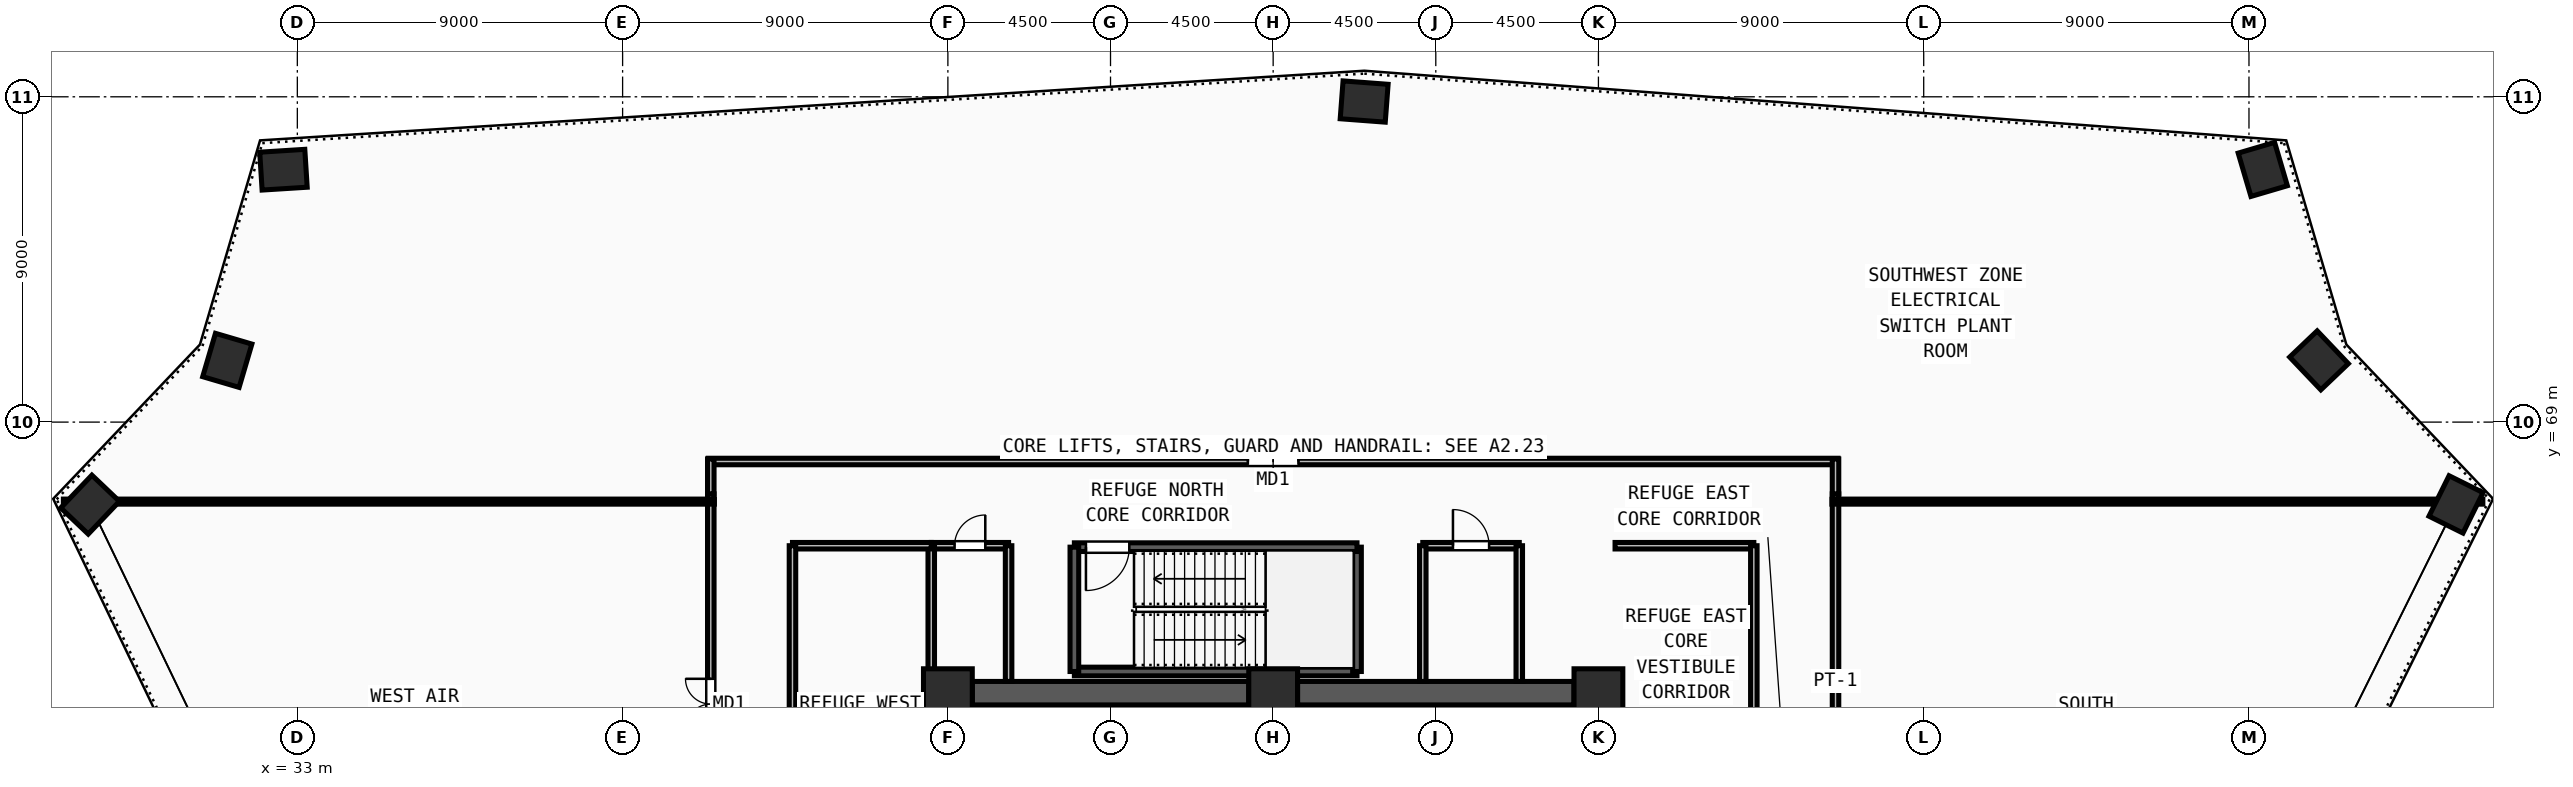
"""IFC4 building model, lengths in metres.
Left out: names, types, materials, properties, quantities, classifications, styles, units other than length and angle.
Written with IfcOpenShell. Run it as: python <this file> out.ifc"""

import sys

from ifc_helpers import new_model, si_unit, direction, frame, frame_2d, origin, origin_2d, place, context, subcontext, project, spatial, rectangle, extrude, source, transform, mapped, element, fill, save


model = new_model("IFC4")
c1 = context("Model", 3, precision=1e-05, world=origin(), true_north=direction((0.0, 1.0)))
c2 = subcontext(c1, "Body", "Model", "MODEL_VIEW")
j1 = project(units=[si_unit("LENGTHUNIT", "METRE"), si_unit("PLANEANGLEUNIT", "RADIAN")], contexts=[c1])
p1 = place(None, origin())
s1 = spatial("IfcSite", under=j1, at=p1, CompositionType="ELEMENT")
p2 = place(p1, origin())
s2 = spatial("IfcBuilding", under=s1, at=p2, CompositionType="ELEMENT")
p3 = place(p2, frame((0.0, 0.0, 231.75)))
s3 = spatial("IfcBuildingStorey", under=s2, at=p3, CompositionType="ELEMENT", Elevation=231.75)
m1 = source(origin(), c2, "Body", "SweptSolid", [
    extrude(rectangle(XDim=1.35, YDim=1.35, at=origin_2d()), origin(), (0.0, 0.0, 1.0), 4.5),
])
for number, where, z_axis, x_axis in (
    (1, (69.0, 61.5, 0.0), (0.0, 0.0, 1.0), (1.0, 0.0, 0.0)),
    (2, (60.0, 61.5, 0.0), (0.0, 0.0, 1.0), (1.0, 0.0, 0.0)),
    (3, (51.0, 61.5, 0.0), (0.0, 0.0, 1.0), (1.0, 0.0, 0.0)),
):
    element("IfcColumn", number, at=place(p3, frame(where, z_axis=z_axis, x_axis=x_axis)), inside=s3, PredefinedType="COLUMN", context=c2, shape_type="MappedRepresentation", body=[
        mapped(m1, transform((0.0, 0.0, 0.0), x_axis=(1.0, 0.0, 0.0), y_axis=(0.0, 1.0, 0.0), z_axis=(0.0, 0.0, 1.0), scale=1.0)),
    ])
m2 = source(origin(), c2, "Body", "SweptSolid", [
    extrude(rectangle(XDim=1.25, YDim=1.05, at=origin_2d()), origin(), (0.0, 0.0, 1.0), 4.5),
])
for number, where, z_axis, x_axis in (
    (4, (27.265, 66.717, 0.0), (0.0, 0.0, 1.0), (0.689, 0.724, 0.0)),
    (5, (31.062, 70.708, 0.0), (0.0, 0.0, 1.0), (0.283, 0.959, 0.0)),
    (6, (32.616, 75.983, 0.0), (0.0, 0.0, 1.0), (0.998, 0.063, 0.0)),
    (7, (62.518, 77.869, 0.0), (0.0, 0.0, 1.0), (-0.997, 0.075, 0.0)),
    (8, (87.382, 75.991, 0.0), (0.0, 0.0, 1.0), (-0.283, 0.959, 0.0)),
    (9, (88.938, 70.708, 0.0), (0.0, 0.0, 1.0), (-0.689, 0.724, 0.0)),
    (10, (92.729, 66.723, 0.0), (0.0, 0.0, 1.0), (0.444, 0.896, 0.0)),
):
    element("IfcColumn", number, at=place(p3, frame(where, z_axis=z_axis, x_axis=x_axis)), inside=s3, PredefinedType="COLUMN", context=c2, shape_type="MappedRepresentation", body=[
        mapped(m2, transform((0.0, 0.0, 0.0), x_axis=(1.0, 0.0, 0.0), y_axis=(0.0, 1.0, 0.0), z_axis=(0.0, 0.0, 1.0), scale=1.0)),
    ])
for number, where, z_axis, x_axis in (
    (11, (51.675, 61.5, 0.0), (0.0, 0.0, 1.0), (1.0, 0.0, 0.0)),
    (12, (60.675, 61.5, 0.0), (0.0, 0.0, 1.0), (1.0, 0.0, 0.0)),
):
    element("IfcWall", number, at=place(p3, frame(where, z_axis=z_axis, x_axis=x_axis)), inside=s3, PredefinedType="SHEAR", context=c2, shape_type="SweptSolid", body=[
        extrude(rectangle(XDim=7.65, YDim=0.65, at=frame_2d((3.825, 0.0))), origin(), (0.0, 0.0, 1.0), 4.32),
    ])
p4 = place(p3, frame((54.5, 62.1, 0.0), z_axis=(0.0, 0.0, 1.0), x_axis=(1.0, 0.0, 0.0)))
e13 = element("IfcWall", 13, at=p4, inside=s3, PredefinedType="SOLIDWALL", context=c2, shape_type="SweptSolid", body=[
    extrude(rectangle(XDim=7.82, YDim=0.24, at=frame_2d((3.91, 0.0))), origin(), (0.0, 0.0, 1.0), 4.32),
])
p5 = place(p3, frame((62.32, 62.1, 0.0), z_axis=(0.0, 0.0, 1.0), x_axis=(0.0, 1.0, 0.0)))
e14 = element("IfcWall", 14, at=p5, inside=s3, PredefinedType="SOLIDWALL", context=c2, shape_type="SweptSolid", body=[
    extrude(rectangle(XDim=3.44, YDim=0.24, at=frame_2d((1.72, 0.0))), origin(), (0.0, 0.0, 1.0), 4.32),
])
p6 = place(p3, frame((62.32, 65.54, 0.0), z_axis=(0.0, 0.0, 1.0), x_axis=(-1.0, 0.0, 0.0)))
e15 = element("IfcWall", 15, at=p6, inside=s3, PredefinedType="SOLIDWALL", context=c2, shape_type="SweptSolid", body=[
    extrude(rectangle(XDim=7.82, YDim=0.24, at=frame_2d((3.91, 0.0))), origin(), (0.0, 0.0, 1.0), 4.32),
])
m3 = source(origin(), c2, "Body", "SweptSolid", [
    extrude(rectangle(XDim=1.2, YDim=2.2, at=frame_2d((0.6, 1.1))), frame((0.0, 0.13, 0.0), z_axis=(0.0, -1.0, 0.0), x_axis=(1.0, 0.0, 0.0)), (0.0, 0.0, 1.0), 0.26),
])
p7 = place(p6, frame((6.3, 0.0, 0.0)))
e16 = element("IfcOpeningElement", 16, at=p7, cuts=e15, PredefinedType="OPENING", context=c2, shape_type="MappedRepresentation", body=[
    mapped(m3, transform((0.0, 0.0, 0.0), x_axis=(1.0, 0.0, 0.0), y_axis=(0.0, 1.0, 0.0), z_axis=(0.0, 0.0, 1.0), scale=1.0)),
])
p8 = place(p3, frame((54.5, 65.54, 0.0), z_axis=(0.0, 0.0, 1.0), x_axis=(0.0, -1.0, 0.0)))
e17 = element("IfcWall", 17, at=p8, inside=s3, PredefinedType="SOLIDWALL", context=c2, shape_type="SweptSolid", body=[
    extrude(rectangle(XDim=3.44, YDim=0.24, at=frame_2d((1.72, 0.0))), origin(), (0.0, 0.0, 1.0), 4.32),
])
p9 = place(p3, frame((50.54, 65.58, 0.0), z_axis=(0.0, 0.0, 1.0), x_axis=(1.0, 0.0, 0.0)))
e18 = element("IfcWall", 18, at=p9, inside=s3, PredefinedType="PARTITIONING", context=c2, shape_type="SweptSolid", body=[
    extrude(rectangle(XDim=2.14, YDim=0.18, at=frame_2d((1.07, 0.0))), origin(), (0.0, 0.0, 1.0), 4.32),
])
m4 = source(origin(), c2, "Body", "SweptSolid", [
    extrude(rectangle(XDim=0.85, YDim=2.1, at=frame_2d((0.425, 1.05))), frame((0.0, 0.1, 0.0), z_axis=(0.0, -1.0, 0.0), x_axis=(1.0, 0.0, 0.0)), (0.0, 0.0, 1.0), 0.2),
])
p10 = place(p9, frame((0.645, 0.0, 0.0)))
e19 = element("IfcOpeningElement", 19, at=p10, cuts=e18, PredefinedType="OPENING", context=c2, shape_type="MappedRepresentation", body=[
    mapped(m4, transform((0.0, 0.0, 0.0), x_axis=(1.0, 0.0, 0.0), y_axis=(0.0, 1.0, 0.0), z_axis=(0.0, 0.0, 1.0), scale=1.0)),
])
p11 = place(p3, frame((64.14, 65.58, 0.0), z_axis=(0.0, 0.0, 1.0), x_axis=(1.0, 0.0, 0.0)))
e20 = element("IfcWall", 20, at=p11, inside=s3, PredefinedType="PARTITIONING", context=c2, shape_type="SweptSolid", body=[
    extrude(rectangle(XDim=2.67, YDim=0.18, at=frame_2d((1.335, 0.0))), origin(), (0.0, 0.0, 1.0), 4.32),
])
m5 = source(origin(), c2, "Body", "SweptSolid", [
    extrude(rectangle(XDim=1.0, YDim=2.2, at=frame_2d((0.5, 1.1))), frame((0.0, 0.1, 0.0), z_axis=(0.0, -1.0, 0.0), x_axis=(1.0, 0.0, 0.0)), (0.0, 0.0, 1.0), 0.2),
])
p12 = place(p11, frame((0.835, 0.0, 0.0)))
e21 = element("IfcOpeningElement", 21, at=p12, cuts=e20, PredefinedType="OPENING", context=c2, shape_type="MappedRepresentation", body=[
    mapped(m5, transform((0.0, 0.0, 0.0), x_axis=(1.0, 0.0, 0.0), y_axis=(0.0, 1.0, 0.0), z_axis=(0.0, 0.0, 1.0), scale=1.0)),
])
p13 = place(p3, frame((75.56, 67.015, 0.0), z_axis=(0.0, 0.0, 1.0), x_axis=(0.0, -1.0, 0.0)))
e22 = element("IfcWall", 22, at=p13, inside=s3, PredefinedType="PARTITIONING", context=c2, shape_type="SweptSolid", body=[
    extrude(rectangle(XDim=22.43, YDim=0.18, at=frame_2d((11.215, 0.0))), origin(), (0.0, 0.0, 1.0), 4.32),
])
m6 = source(origin(), c2, "Body", "SweptSolid", [
    extrude(rectangle(XDim=1.3, YDim=2.2, at=frame_2d((0.65, 1.1))), frame((0.0, 0.1, 0.0), z_axis=(0.0, -1.0, 0.0), x_axis=(1.0, 0.0, 0.0)), (0.0, 0.0, 1.0), 0.2),
])
p14 = place(p13, frame((10.565, 0.0, 0.0)))
e23 = element("IfcOpeningElement", 23, at=p14, cuts=e22, PredefinedType="OPENING", context=c2, shape_type="MappedRepresentation", body=[
    mapped(m6, transform((0.0, 0.0, 0.0), x_axis=(1.0, 0.0, 0.0), y_axis=(0.0, 1.0, 0.0), z_axis=(0.0, 0.0, 1.0), scale=1.0)),
])
p15 = place(p3, frame((44.37, 67.91, 0.0), z_axis=(0.0, 0.0, 1.0), x_axis=(1.0, 0.0, 0.0)))
e24 = element("IfcWall", 24, at=p15, inside=s3, PredefinedType="PARTITIONING", context=c2, shape_type="SweptSolid", body=[
    extrude(rectangle(XDim=31.26, YDim=0.18, at=frame_2d((15.63, 0.0))), origin(), (0.0, 0.0, 1.0), 3.955),
])
m7 = source(origin(), c2, "Body", "SweptSolid", [
    extrude(rectangle(XDim=1.4, YDim=2.25, at=frame_2d((0.7, 1.125))), frame((0.0, 0.1, 0.0), z_axis=(0.0, -1.0, 0.0), x_axis=(1.0, 0.0, 0.0)), (0.0, 0.0, 1.0), 0.2),
])
p16 = place(p15, frame((14.93, 0.0, 0.0)))
e25 = element("IfcOpeningElement", 25, at=p16, cuts=e24, PredefinedType="OPENING", context=c2, shape_type="MappedRepresentation", body=[
    mapped(m7, transform((0.0, 0.0, 0.0), x_axis=(1.0, 0.0, 0.0), y_axis=(0.0, 1.0, 0.0), z_axis=(0.0, 0.0, 1.0), scale=1.0)),
])
p17 = place(p3, frame((44.44, 55.98, 0.0), z_axis=(0.0, 0.0, 1.0), x_axis=(0.0, 1.0, 0.0)))
e26 = element("IfcWall", 26, at=p17, inside=s3, PredefinedType="PARTITIONING", context=c2, shape_type="SweptSolid", body=[
    extrude(rectangle(XDim=11.035, YDim=0.18, at=frame_2d((5.518, 0.0))), origin(), (0.0, 0.0, 1.0), 4.32),
])
p18 = place(p17, frame((4.518, 0.0, 0.0)))
e27 = element("IfcOpeningElement", 27, at=p18, cuts=e26, PredefinedType="OPENING", context=c2, shape_type="MappedRepresentation", body=[
    mapped(m7, transform((0.0, 0.0, 0.0), x_axis=(1.0, 0.0, 0.0), y_axis=(0.0, 1.0, 0.0), z_axis=(0.0, 0.0, 1.0), scale=1.0)),
])
p19 = place(p3, frame((50.54, 61.95, 0.0), z_axis=(0.0, 0.0, 1.0), x_axis=(0.0, 1.0, 0.0)))
e28 = element("IfcWall", 28, at=p19, inside=s3, PredefinedType="PARTITIONING", context=c2, shape_type="SweptSolid", body=[
    extrude(rectangle(XDim=3.63, YDim=0.18, at=frame_2d((1.815, 0.0))), origin(), (0.0, 0.0, 1.0), 4.32),
])
for number, where, z_axis, x_axis in (
    (29, (52.68, 61.825, 0.0), (0.0, 0.0, 1.0), (0.0, 1.0, 0.0)),
    (30, (64.14, 61.825, 0.0), (0.0, 0.0, 1.0), (0.0, 1.0, 0.0)),
    (31, (66.81, 61.825, 0.0), (0.0, 0.0, 1.0), (0.0, 1.0, 0.0)),
):
    element("IfcWall", number, at=place(p3, frame(where, z_axis=z_axis, x_axis=x_axis)), inside=s3, PredefinedType="PARTITIONING", context=c2, shape_type="SweptSolid", body=[
        extrude(rectangle(XDim=3.755, YDim=0.18, at=frame_2d((1.877, 0.0))), origin(), (0.0, 0.0, 1.0), 4.32),
    ])
for number, where, z_axis, x_axis in (
    (32, (46.7, 65.58, 0.0), (0.0, 0.0, 1.0), (1.0, 0.0, 0.0)),
    (33, (69.46, 65.58, 0.0), (0.0, 0.0, 1.0), (1.0, 0.0, 0.0)),
):
    element("IfcWall", number, at=place(p3, frame(where, z_axis=z_axis, x_axis=x_axis)), inside=s3, PredefinedType="PARTITIONING", context=c2, shape_type="SweptSolid", body=[
        extrude(rectangle(XDim=3.84, YDim=0.18, at=frame_2d((1.92, 0.0))), origin(), (0.0, 0.0, 1.0), 4.32),
    ])
for number, where, z_axis, x_axis in (
    (34, (46.7, 60.06, 0.0), (0.0, 0.0, 1.0), (0.0, 1.0, 0.0)),
    (35, (73.3, 60.06, 0.0), (0.0, 0.0, 1.0), (0.0, 1.0, 0.0)),
):
    element("IfcWall", number, at=place(p3, frame(where, z_axis=z_axis, x_axis=x_axis)), inside=s3, PredefinedType="PARTITIONING", context=c2, shape_type="SweptSolid", body=[
        extrude(rectangle(XDim=5.52, YDim=0.18, at=frame_2d((2.76, 0.0))), origin(), (0.0, 0.0, 1.0), 4.32),
    ])
for number, where, z_axis, x_axis in (
    (36, (44.44, 67.015, 0.0), (0.0, 0.0, 1.0), (0.0, 1.0, 0.0)),
    (37, (75.56, 67.98, 0.0), (0.0, 0.0, 1.0), (0.0, -1.0, 0.0)),
):
    element("IfcWall", number, at=place(p3, frame(where, z_axis=z_axis, x_axis=x_axis)), inside=s3, PredefinedType="PARTITIONING", context=c2, shape_type="SweptSolid", body=[
        extrude(rectangle(XDim=0.965, YDim=0.18, at=frame_2d((0.482, 0.0))), origin(), (0.0, 0.0, 1.0), 4.32),
    ])
p20 = place(p3, frame((44.54, 66.8, 0.0), z_axis=(0.0, 0.0, 1.0), x_axis=(-1.0, 0.0, 0.0)))
e38 = element("IfcWall", 38, at=p20, inside=s3, PredefinedType="PARTITIONING", context=c2, shape_type="SweptSolid", body=[
    extrude(rectangle(XDim=18.013, YDim=0.14, at=frame_2d((9.006, 0.0))), origin(), (0.0, 0.0, 1.0), 4.32),
])
p21 = place(p3, frame((75.46, 66.8, 0.0), z_axis=(0.0, 0.0, 1.0), x_axis=(1.0, 0.0, 0.0)))
e39 = element("IfcWall", 39, at=p21, inside=s3, PredefinedType="PARTITIONING", context=c2, shape_type="SweptSolid", body=[
    extrude(rectangle(XDim=18.011, YDim=0.14, at=frame_2d((9.005, 0.0))), origin(), (0.0, 0.0, 1.0), 4.32),
])
m8 = source(origin(), c2, "Body", "SweptSolid", [
    extrude(rectangle(XDim=1.2, YDim=2.2, at=frame_2d((0.6, 1.1))), frame((0.0, 0.025, 0.0), z_axis=(0.0, -1.0, 0.0), x_axis=(1.0, 0.0, 0.0)), (0.0, 0.0, 1.0), 0.05),
])
p22 = place(p7, origin())
e40 = element("IfcDoor", 40, at=p22, inside=s3, OperationType="SINGLE_SWING_RIGHT", PredefinedType="DOOR", context=c2, shape_type="MappedRepresentation", body=[
    mapped(m8, transform((0.0, 0.0, 0.0), x_axis=(1.0, 0.0, 0.0), y_axis=(0.0, 1.0, 0.0), z_axis=(0.0, 0.0, 1.0), scale=1.0)),
])
fill(e16, e40)
m9 = source(origin(), c2, "Body", "SweptSolid", [
    extrude(rectangle(XDim=0.85, YDim=2.1, at=frame_2d((0.425, 1.05))), frame((0.0, 0.025, 0.0), z_axis=(0.0, -1.0, 0.0), x_axis=(1.0, 0.0, 0.0)), (0.0, 0.0, 1.0), 0.05),
])
p23 = place(p10, origin())
e41 = element("IfcDoor", 41, at=p23, inside=s3, OperationType="SINGLE_SWING_RIGHT", PredefinedType="DOOR", context=c2, shape_type="MappedRepresentation", body=[
    mapped(m9, transform((0.0, 0.0, 0.0), x_axis=(1.0, 0.0, 0.0), y_axis=(0.0, 1.0, 0.0), z_axis=(0.0, 0.0, 1.0), scale=1.0)),
])
fill(e19, e41)
m10 = source(origin(), c2, "Body", "SweptSolid", [
    extrude(rectangle(XDim=1.0, YDim=2.2, at=frame_2d((0.5, 1.1))), frame((0.0, 0.025, 0.0), z_axis=(0.0, -1.0, 0.0), x_axis=(1.0, 0.0, 0.0)), (0.0, 0.0, 1.0), 0.05),
])
p24 = place(p12, origin())
e42 = element("IfcDoor", 42, at=p24, inside=s3, OperationType="SINGLE_SWING_LEFT", PredefinedType="DOOR", context=c2, shape_type="MappedRepresentation", body=[
    mapped(m10, transform((0.0, 0.0, 0.0), x_axis=(1.0, 0.0, 0.0), y_axis=(0.0, 1.0, 0.0), z_axis=(0.0, 0.0, 1.0), scale=1.0)),
])
fill(e21, e42)
m11 = source(origin(), c2, "Body", "SweptSolid", [
    extrude(rectangle(XDim=1.4, YDim=2.25, at=frame_2d((0.7, 1.125))), frame((0.0, 0.025, 0.0), z_axis=(0.0, -1.0, 0.0), x_axis=(1.0, 0.0, 0.0)), (0.0, 0.0, 1.0), 0.05),
])
p25 = place(p16, origin())
e43 = element("IfcDoor", 43, at=p25, inside=s3, OperationType="DOUBLE_DOOR_SINGLE_SWING", PredefinedType="DOOR", context=c2, shape_type="MappedRepresentation", body=[
    mapped(m11, transform((0.0, 0.0, 0.0), x_axis=(1.0, 0.0, 0.0), y_axis=(0.0, 1.0, 0.0), z_axis=(0.0, 0.0, 1.0), scale=1.0)),
])
fill(e25, e43)
p26 = place(p18, origin())
e44 = element("IfcDoor", 44, at=p26, inside=s3, OperationType="DOUBLE_DOOR_SINGLE_SWING", PredefinedType="DOOR", context=c2, shape_type="MappedRepresentation", body=[
    mapped(m11, transform((0.0, 0.0, 0.0), x_axis=(1.0, 0.0, 0.0), y_axis=(0.0, 1.0, 0.0), z_axis=(0.0, 0.0, 1.0), scale=1.0)),
])
fill(e27, e44)
save(model, sys.argv[1])
